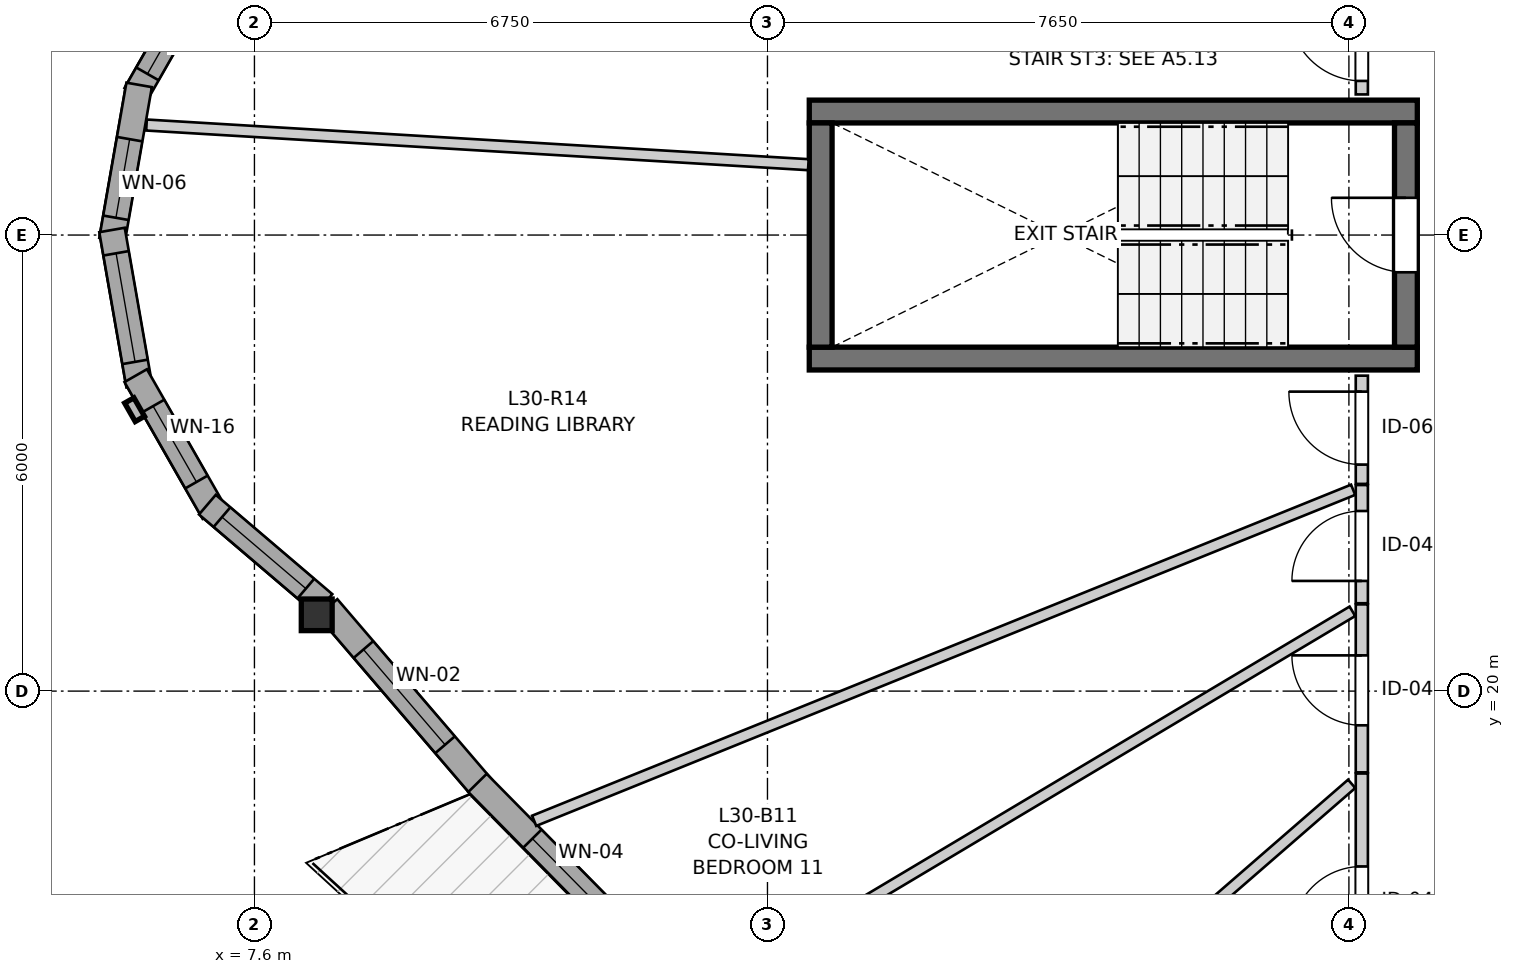
"""IFC4 building model, lengths in metres.
Left out: names, types, materials, properties, quantities, classifications, styles, units other than length and angle.
Written with IfcOpenShell. Run it as: python <this file> out.ifc"""

import sys

from ifc_helpers import new_model, si_unit, direction, frame, frame_2d, origin, origin_2d, place, context, subcontext, project, spatial, rectangle, i_section, extrude, source, transform, mapped, element, fill, save


model = new_model("IFC4")
c1 = context("Model", 3, precision=1e-05, world=origin(), true_north=direction((0.0, 1.0)))
c2 = subcontext(c1, "Body", "Model", "MODEL_VIEW")
j1 = project(units=[si_unit("LENGTHUNIT", "METRE"), si_unit("PLANEANGLEUNIT", "RADIAN")], contexts=[c1])
p1 = place(None, origin())
s1 = spatial("IfcSite", under=j1, at=p1, CompositionType="ELEMENT")
p2 = place(p1, origin())
s2 = spatial("IfcBuilding", under=s1, at=p2, CompositionType="ELEMENT")
p3 = place(p2, frame((0.0, 0.0, 102.4)))
s3 = spatial("IfcBuildingStorey", under=s2, at=p3, CompositionType="ELEMENT", Elevation=102.4)
for number, where, z_axis, x_axis in (
    (1, (14.9, 24.375, 0.0), (0.0, 0.0, 1.0), (1.0, 0.0, 0.0)),
    (2, (22.9, 27.625, 0.0), (0.0, 0.0, 1.0), (-1.0, 0.0, 0.0)),
):
    element("IfcWall", number, at=place(p3, frame(where, z_axis=z_axis, x_axis=x_axis)), inside=s3, PredefinedType="SHEAR", context=c2, shape_type="SweptSolid", body=[
        extrude(rectangle(XDim=8.0, YDim=0.3, at=frame_2d((4.0, 0.0))), origin(), (0.0, 0.0, 1.0), 2.95),
    ])
p4 = place(p3, frame((15.05, 27.475, 0.0), z_axis=(0.0, 0.0, 1.0), x_axis=(0.0, -1.0, 0.0)))
e3 = element("IfcWall", 3, at=p4, inside=s3, PredefinedType="SHEAR", context=c2, shape_type="SweptSolid", body=[
    extrude(rectangle(XDim=2.95, YDim=0.3, at=frame_2d((1.475, 0.0))), origin(), (0.0, 0.0, 1.0), 2.95),
])
p5 = place(p3, frame((22.75, 24.525, 0.0), z_axis=(0.0, 0.0, 1.0), x_axis=(0.0, 1.0, 0.0)))
e4 = element("IfcWall", 4, at=p5, inside=s3, PredefinedType="SHEAR", context=c2, shape_type="SweptSolid", body=[
    extrude(rectangle(XDim=2.95, YDim=0.3, at=frame_2d((1.475, 0.0))), origin(), (0.0, 0.0, 1.0), 2.95),
])
p6 = place(p5, frame((0.985, 0.0, 0.0)))
e5 = element("IfcOpeningElement", 5, at=p6, cuts=e4, PredefinedType="OPENING", context=c2, shape_type="SweptSolid", body=[
    extrude(rectangle(XDim=0.98, YDim=2.15, at=frame_2d((0.49, 1.075))), frame((0.0, 0.16, 0.0), z_axis=(0.0, -1.0, 0.0), x_axis=(1.0, 0.0, 0.0)), (0.0, 0.0, 1.0), 0.32),
])
m1 = source(origin(), c2, "Body", "SweptSolid", [
    extrude(i_section(OverallWidth=0.406, OverallDepth=0.416, WebThickness=0.027, FlangeThickness=0.044, FilletRadius=0.015, at=origin_2d()), origin(), (0.0, 0.0, 1.0), 2.95),
])
p7 = place(p3, frame((8.419, 21.004, 0.0), z_axis=(0.0, 0.0, 1.0), x_axis=(1.0, 0.0, 0.0)))
e6 = element("IfcColumn", 6, at=p7, inside=s3, PredefinedType="PILASTER", context=c2, shape_type="MappedRepresentation", body=[
    mapped(m1, transform((0.0, 0.0, 0.0), x_axis=(1.0, 0.0, 0.0), y_axis=(0.0, 1.0, 0.0), z_axis=(0.0, 0.0, 1.0), scale=1.0)),
])
p8 = place(p3, frame((7.066, 29.65, 0.0), z_axis=(0.0, 0.0, 1.0), x_axis=(-0.496037473582, -0.868301114132, 0.0)))
e7 = element("IfcWall", 7, at=p8, inside=s3, PredefinedType="SOLIDWALL", context=c2, shape_type="SweptSolid", body=[
    extrude(rectangle(XDim=2.073, YDim=0.34, at=frame_2d((1.037, 0.0))), origin(), (0.0, 0.0, 1.0), 2.48),
])
p9 = place(p8, frame((0.312, 0.0, 0.82)))
e8 = element("IfcOpeningElement", 8, at=p9, cuts=e7, PredefinedType="OPENING", context=c2, shape_type="SweptSolid", body=[
    extrude(rectangle(XDim=1.45, YDim=1.25, at=frame_2d((0.725, 0.625))), frame((0.0, 0.18, 0.0), z_axis=(0.0, -1.0, 0.0), x_axis=(1.0, 0.0, 0.0)), (0.0, 0.0, 1.0), 0.36),
])
p10 = place(p3, frame((6.083, 27.975, 0.0), z_axis=(0.0, 0.0, 1.0), x_axis=(-0.172186061474, -0.985064444711, 0.0)))
e9 = element("IfcWall", 9, at=p10, inside=s3, PredefinedType="SOLIDWALL", context=c2, shape_type="SweptSolid", body=[
    extrude(rectangle(XDim=2.073, YDim=0.34, at=frame_2d((1.037, 0.0))), origin(), (0.0, 0.0, 1.0), 2.48),
])
p11 = place(p10, frame((0.725, 0.0, 0.82)))
e10 = element("IfcOpeningElement", 10, at=p11, cuts=e9, PredefinedType="OPENING", context=c2, shape_type="SweptSolid", body=[
    extrude(rectangle(XDim=1.05, YDim=1.45, at=frame_2d((0.525, 0.725))), frame((0.0, 0.18, 0.0), z_axis=(0.0, -1.0, 0.0), x_axis=(1.0, 0.0, 0.0)), (0.0, 0.0, 1.0), 0.36),
])
p12 = place(p3, frame((5.726, 26.067, 0.0), z_axis=(0.0, 0.0, 1.0), x_axis=(0.172186061474, -0.985064444711, 0.0)))
e11 = element("IfcWall", 11, at=p12, inside=s3, PredefinedType="SOLIDWALL", context=c2, shape_type="SweptSolid", body=[
    extrude(rectangle(XDim=2.073, YDim=0.34, at=frame_2d((1.037, 0.0))), origin(), (0.0, 0.0, 1.0), 2.48),
])
p13 = place(p12, frame((0.312, 0.0, 0.82)))
e12 = element("IfcOpeningElement", 12, at=p13, cuts=e11, PredefinedType="OPENING", context=c2, shape_type="SweptSolid", body=[
    extrude(rectangle(XDim=1.45, YDim=1.25, at=frame_2d((0.725, 0.625))), frame((0.0, 0.18, 0.0), z_axis=(0.0, -1.0, 0.0), x_axis=(1.0, 0.0, 0.0)), (0.0, 0.0, 1.0), 0.36),
])
p14 = place(p3, frame((6.038, 24.15, 0.0), z_axis=(0.0, 0.0, 1.0), x_axis=(0.496037473582, -0.868301114132, 0.0)))
e13 = element("IfcWall", 13, at=p14, inside=s3, PredefinedType="SOLIDWALL", context=c2, shape_type="SweptSolid", body=[
    extrude(rectangle(XDim=2.073, YDim=0.34, at=frame_2d((1.037, 0.0))), origin(), (0.0, 0.0, 1.0), 2.48),
])
p15 = place(p14, frame((0.461, 0.0, 0.82)))
e14 = element("IfcOpeningElement", 14, at=p15, cuts=e13, PredefinedType="OPENING", context=c2, shape_type="SweptSolid", body=[
    extrude(rectangle(XDim=1.15, YDim=1.2, at=frame_2d((0.575, 0.6))), frame((0.0, 0.18, 0.0), z_axis=(0.0, -1.0, 0.0), x_axis=(1.0, 0.0, 0.0)), (0.0, 0.0, 1.0), 0.36),
])
p16 = place(p3, frame((6.981, 22.453, 0.0), z_axis=(0.0, 0.0, 1.0), x_axis=(0.761092561451, -0.648643286332, 0.0)))
e15 = element("IfcWall", 15, at=p16, inside=s3, PredefinedType="SOLIDWALL", context=c2, shape_type="SweptSolid", body=[
    extrude(rectangle(XDim=2.015, YDim=0.34, at=frame_2d((1.007, 0.0))), origin(), (0.0, 0.0, 1.0), 2.48),
])
p17 = place(p16, frame((0.252, 0.0, 0.82)))
e16 = element("IfcOpeningElement", 16, at=p17, cuts=e15, PredefinedType="OPENING", context=c2, shape_type="SweptSolid", body=[
    extrude(rectangle(XDim=1.45, YDim=1.25, at=frame_2d((0.725, 0.625))), frame((0.0, 0.18, 0.0), z_axis=(0.0, -1.0, 0.0), x_axis=(1.0, 0.0, 0.0)), (0.0, 0.0, 1.0), 0.36),
])
p18 = place(p3, frame((8.562, 21.099, 0.0), z_axis=(0.0, 0.0, 1.0), x_axis=(0.650778499588, -0.75926763692, 0.0)))
e17 = element("IfcWall", 17, at=p18, inside=s3, PredefinedType="SOLIDWALL", context=c2, shape_type="SweptSolid", body=[
    extrude(rectangle(XDim=3.124, YDim=0.34, at=frame_2d((1.562, 0.0))), origin(), (0.0, 0.0, 1.0), 2.48),
])
p19 = place(p18, frame((0.727, 0.0, 0.82)))
e18 = element("IfcOpeningElement", 18, at=p19, cuts=e17, PredefinedType="OPENING", context=c2, shape_type="SweptSolid", body=[
    extrude(rectangle(XDim=1.65, YDim=1.45, at=frame_2d((0.825, 0.725))), frame((0.0, 0.18, 0.0), z_axis=(0.0, -1.0, 0.0), x_axis=(1.0, 0.0, 0.0)), (0.0, 0.0, 1.0), 0.36),
])
p20 = place(p3, frame((10.535, 18.792, 0.0), z_axis=(0.0, 0.0, 1.0), x_axis=(0.701902141766, -0.7122733909, 0.0)))
e19 = element("IfcWall", 19, at=p20, inside=s3, PredefinedType="SOLIDWALL", context=c2, shape_type="SweptSolid", body=[
    extrude(rectangle(XDim=2.848, YDim=0.34, at=frame_2d((1.424, 0.0))), origin(), (0.0, 0.0, 1.0), 2.48),
])
p21 = place(p20, frame((1.029, 0.0, 0.82)))
e20 = element("IfcOpeningElement", 20, at=p21, cuts=e19, PredefinedType="OPENING", context=c2, shape_type="SweptSolid", body=[
    extrude(rectangle(XDim=1.35, YDim=1.45, at=frame_2d((0.675, 0.725))), frame((0.0, 0.18, 0.0), z_axis=(0.0, -1.0, 0.0), x_axis=(1.0, 0.0, 0.0)), (0.0, 0.0, 1.0), 0.36),
])
p22 = place(p3, frame((22.17, 15.57, 0.0), z_axis=(0.0, 0.0, 1.0), x_axis=(0.0, 1.0, 0.0)))
e21 = element("IfcWall", 21, at=p22, inside=s3, PredefinedType="PARTITIONING", context=c2, shape_type="SweptSolid", body=[
    extrude(rectangle(XDim=3.346, YDim=0.16, at=frame_2d((1.673, 0.0))), origin(), (0.0, 0.0, 1.0), 2.95),
])
p23 = place(p22, frame((1.203, 0.0, 0.0)))
e22 = element("IfcOpeningElement", 22, at=p23, cuts=e21, PredefinedType="OPENING", context=c2, shape_type="SweptSolid", body=[
    extrude(rectangle(XDim=0.92, YDim=2.1, at=frame_2d((0.46, 1.05))), frame((0.0, 0.09, 0.0), z_axis=(0.0, -1.0, 0.0), x_axis=(1.0, 0.0, 0.0)), (0.0, 0.0, 1.0), 0.18),
])
p24 = place(p3, frame((22.17, 18.931, 0.0), z_axis=(0.0, 0.0, 1.0), x_axis=(0.0, 1.0, 0.0)))
e23 = element("IfcWall", 23, at=p24, inside=s3, PredefinedType="PARTITIONING", context=c2, shape_type="SweptSolid", body=[
    extrude(rectangle(XDim=2.21, YDim=0.16, at=frame_2d((1.105, 0.0))), origin(), (0.0, 0.0, 1.0), 2.95),
])
p25 = place(p24, frame((0.619, 0.0, 0.0)))
e24 = element("IfcOpeningElement", 24, at=p25, cuts=e23, PredefinedType="OPENING", context=c2, shape_type="SweptSolid", body=[
    extrude(rectangle(XDim=0.92, YDim=2.1, at=frame_2d((0.46, 1.05))), frame((0.0, 0.09, 0.0), z_axis=(0.0, -1.0, 0.0), x_axis=(1.0, 0.0, 0.0)), (0.0, 0.0, 1.0), 0.18),
])
p26 = place(p3, frame((22.17, 21.156, 0.0), z_axis=(0.0, 0.0, 1.0), x_axis=(0.0, 1.0, 0.0)))
e25 = element("IfcWall", 25, at=p26, inside=s3, PredefinedType="PARTITIONING", context=c2, shape_type="SweptSolid", body=[
    extrude(rectangle(XDim=1.555, YDim=0.16, at=frame_2d((0.777, 0.0))), origin(), (0.0, 0.0, 1.0), 2.95),
])
p27 = place(p26, frame((0.293, 0.0, 0.0)))
e26 = element("IfcOpeningElement", 26, at=p27, cuts=e25, PredefinedType="OPENING", context=c2, shape_type="SweptSolid", body=[
    extrude(rectangle(XDim=0.92, YDim=2.1, at=frame_2d((0.46, 1.05))), frame((0.0, 0.09, 0.0), z_axis=(0.0, -1.0, 0.0), x_axis=(1.0, 0.0, 0.0)), (0.0, 0.0, 1.0), 0.18),
])
p28 = place(p3, frame((22.17, 22.726, 0.0), z_axis=(0.0, 0.0, 1.0), x_axis=(0.0, 1.0, 0.0)))
e27 = element("IfcWall", 27, at=p28, inside=s3, PredefinedType="PARTITIONING", context=c2, shape_type="SweptSolid", body=[
    extrude(rectangle(XDim=1.424, YDim=0.16, at=frame_2d((0.712, 0.0))), origin(), (0.0, 0.0, 1.0), 2.95),
])
p29 = place(p28, frame((0.254, 0.0, 0.0)))
e28 = element("IfcOpeningElement", 28, at=p29, cuts=e27, PredefinedType="OPENING", context=c2, shape_type="SweptSolid", body=[
    extrude(rectangle(XDim=0.96, YDim=2.1, at=frame_2d((0.48, 1.05))), frame((0.0, 0.09, 0.0), z_axis=(0.0, -1.0, 0.0), x_axis=(1.0, 0.0, 0.0)), (0.0, 0.0, 1.0), 0.18),
])
p30 = place(p3, frame((22.17, 27.85, 0.0), z_axis=(0.0, 0.0, 1.0), x_axis=(0.0, 1.0, 0.0)))
e29 = element("IfcWall", 29, at=p30, inside=s3, PredefinedType="PARTITIONING", context=c2, shape_type="SweptSolid", body=[
    extrude(rectangle(XDim=1.283, YDim=0.16, at=frame_2d((0.642, 0.0))), origin(), (0.0, 0.0, 1.0), 2.95),
])
p31 = place(p30, frame((0.177, 0.0, 0.0)))
e30 = element("IfcOpeningElement", 30, at=p31, cuts=e29, PredefinedType="OPENING", context=c2, shape_type="SweptSolid", body=[
    extrude(rectangle(XDim=0.96, YDim=2.1, at=frame_2d((0.48, 1.05))), frame((0.0, 0.09, 0.0), z_axis=(0.0, -1.0, 0.0), x_axis=(1.0, 0.0, 0.0)), (0.0, 0.0, 1.0), 0.18),
])
p32 = place(p3, frame((11.28, 18.294, 0.0), z_axis=(0.0, 0.0, 1.0), x_axis=(0.927137862507, 0.374720407645, 0.0)))
e31 = element("IfcWall", 31, at=p32, inside=s3, PredefinedType="PARTITIONING", context=c2, shape_type="SweptSolid", body=[
    extrude(rectangle(XDim=11.622, YDim=0.145, at=frame_2d((5.811, 0.0))), origin(), (0.0, 0.0, 1.0), 2.95),
])
p33 = place(p3, frame((13.622, 16.028, 0.0), z_axis=(0.0, 0.0, 1.0), x_axis=(0.85896108151, 0.512040877716, 0.0)))
e32 = element("IfcWall", 32, at=p33, inside=s3, PredefinedType="PARTITIONING", context=c2, shape_type="SweptSolid", body=[
    extrude(rectangle(XDim=9.807, YDim=0.145, at=frame_2d((4.904, 0.0))), origin(), (0.0, 0.0, 1.0), 2.95),
])
p34 = place(p3, frame((6.18, 27.448, 0.0), z_axis=(0.0, 0.0, 1.0), x_axis=(0.998209995059, -0.059806402362, 0.0)))
e33 = element("IfcWall", 33, at=p34, inside=s3, PredefinedType="PARTITIONING", context=c2, shape_type="SweptSolid", body=[
    extrude(rectangle(XDim=8.724, YDim=0.145, at=frame_2d((4.362, 0.0))), origin(), (0.0, 0.0, 1.0), 2.95),
])
p35 = place(p3, frame((19.736, 16.782, 0.0), z_axis=(0.0, 0.0, 1.0), x_axis=(0.754964216329, 0.655765988796, 0.0)))
e34 = element("IfcWall", 34, at=p35, inside=s3, PredefinedType="PARTITIONING", context=c2, shape_type="SweptSolid", body=[
    extrude(rectangle(XDim=3.047, YDim=0.145, at=frame_2d((1.523, 0.0))), origin(), (0.0, 0.0, 1.0), 2.95),
])
m2 = source(origin(), c2, "Body", "SweptSolid", [
    extrude(rectangle(XDim=1.45, YDim=1.25, at=frame_2d((0.725, 0.625))), frame((0.0, 0.03, 0.0), z_axis=(0.0, -1.0, 0.0), x_axis=(1.0, 0.0, 0.0)), (0.0, 0.0, 1.0), 0.06),
])
p36 = place(p9, origin())
e35 = element("IfcWindow", 35, at=p36, inside=s3, PartitioningType="SINGLE_PANEL", PredefinedType="WINDOW", context=c2, shape_type="MappedRepresentation", body=[
    mapped(m2, transform((0.0, 0.0, 0.0), x_axis=(1.0, 0.0, 0.0), y_axis=(0.0, 1.0, 0.0), z_axis=(0.0, 0.0, 1.0), scale=1.0)),
])
fill(e8, e35)
m3 = source(origin(), c2, "Body", "SweptSolid", [
    extrude(rectangle(XDim=1.05, YDim=1.45, at=frame_2d((0.525, 0.725))), frame((0.0, 0.03, 0.0), z_axis=(0.0, -1.0, 0.0), x_axis=(1.0, 0.0, 0.0)), (0.0, 0.0, 1.0), 0.06),
])
p37 = place(p11, origin())
e36 = element("IfcWindow", 36, at=p37, inside=s3, PartitioningType="SINGLE_PANEL", PredefinedType="WINDOW", context=c2, shape_type="MappedRepresentation", body=[
    mapped(m3, transform((0.0, 0.0, 0.0), x_axis=(1.0, 0.0, 0.0), y_axis=(0.0, 1.0, 0.0), z_axis=(0.0, 0.0, 1.0), scale=1.0)),
])
fill(e10, e36)
p38 = place(p13, origin())
e37 = element("IfcWindow", 37, at=p38, inside=s3, PartitioningType="SINGLE_PANEL", PredefinedType="WINDOW", context=c2, shape_type="MappedRepresentation", body=[
    mapped(m2, transform((0.0, 0.0, 0.0), x_axis=(1.0, 0.0, 0.0), y_axis=(0.0, 1.0, 0.0), z_axis=(0.0, 0.0, 1.0), scale=1.0)),
])
fill(e12, e37)
m4 = source(origin(), c2, "Body", "SweptSolid", [
    extrude(rectangle(XDim=1.15, YDim=1.2, at=frame_2d((0.575, 0.6))), frame((0.0, 0.03, 0.0), z_axis=(0.0, -1.0, 0.0), x_axis=(1.0, 0.0, 0.0)), (0.0, 0.0, 1.0), 0.06),
])
p39 = place(p15, origin())
e38 = element("IfcWindow", 38, at=p39, inside=s3, PartitioningType="SINGLE_PANEL", PredefinedType="WINDOW", context=c2, shape_type="MappedRepresentation", body=[
    mapped(m4, transform((0.0, 0.0, 0.0), x_axis=(1.0, 0.0, 0.0), y_axis=(0.0, 1.0, 0.0), z_axis=(0.0, 0.0, 1.0), scale=1.0)),
])
fill(e14, e38)
p40 = place(p17, origin())
e39 = element("IfcWindow", 39, at=p40, inside=s3, PartitioningType="SINGLE_PANEL", PredefinedType="WINDOW", context=c2, shape_type="MappedRepresentation", body=[
    mapped(m2, transform((0.0, 0.0, 0.0), x_axis=(1.0, 0.0, 0.0), y_axis=(0.0, 1.0, 0.0), z_axis=(0.0, 0.0, 1.0), scale=1.0)),
])
fill(e16, e39)
m5 = source(origin(), c2, "Body", "SweptSolid", [
    extrude(rectangle(XDim=1.65, YDim=1.45, at=frame_2d((0.825, 0.725))), frame((0.0, 0.03, 0.0), z_axis=(0.0, -1.0, 0.0), x_axis=(1.0, 0.0, 0.0)), (0.0, 0.0, 1.0), 0.06),
])
p41 = place(p19, origin())
e40 = element("IfcWindow", 40, at=p41, inside=s3, PartitioningType="SINGLE_PANEL", PredefinedType="WINDOW", context=c2, shape_type="MappedRepresentation", body=[
    mapped(m5, transform((0.0, 0.0, 0.0), x_axis=(1.0, 0.0, 0.0), y_axis=(0.0, 1.0, 0.0), z_axis=(0.0, 0.0, 1.0), scale=1.0)),
])
fill(e18, e40)
m6 = source(origin(), c2, "Body", "SweptSolid", [
    extrude(rectangle(XDim=1.35, YDim=1.45, at=frame_2d((0.675, 0.725))), frame((0.0, 0.03, 0.0), z_axis=(0.0, -1.0, 0.0), x_axis=(1.0, 0.0, 0.0)), (0.0, 0.0, 1.0), 0.06),
])
p42 = place(p21, origin())
e41 = element("IfcWindow", 41, at=p42, inside=s3, PartitioningType="SINGLE_PANEL", PredefinedType="WINDOW", context=c2, shape_type="MappedRepresentation", body=[
    mapped(m6, transform((0.0, 0.0, 0.0), x_axis=(1.0, 0.0, 0.0), y_axis=(0.0, 1.0, 0.0), z_axis=(0.0, 0.0, 1.0), scale=1.0)),
])
fill(e20, e41)
m7 = source(origin(), c2, "Body", "SweptSolid", [
    extrude(rectangle(XDim=0.98, YDim=2.15, at=frame_2d((0.49, 1.075))), frame((0.0, 0.025, 0.0), z_axis=(0.0, -1.0, 0.0), x_axis=(1.0, 0.0, 0.0)), (0.0, 0.0, 1.0), 0.05),
])
p43 = place(p6, origin())
e42 = element("IfcDoor", 42, at=p43, inside=s3, OperationType="SINGLE_SWING_RIGHT", PredefinedType="DOOR", context=c2, shape_type="MappedRepresentation", body=[
    mapped(m7, transform((0.0, 0.0, 0.0), x_axis=(1.0, 0.0, 0.0), y_axis=(0.0, 1.0, 0.0), z_axis=(0.0, 0.0, 1.0), scale=1.0)),
])
fill(e5, e42)
m8 = source(origin(), c2, "Body", "SweptSolid", [
    extrude(rectangle(XDim=0.92, YDim=2.1, at=frame_2d((0.46, 1.05))), frame((0.0, 0.025, 0.0), z_axis=(0.0, -1.0, 0.0), x_axis=(1.0, 0.0, 0.0)), (0.0, 0.0, 1.0), 0.05),
])
p44 = place(p23, origin())
e43 = element("IfcDoor", 43, at=p44, inside=s3, OperationType="SINGLE_SWING_LEFT", PredefinedType="DOOR", context=c2, shape_type="MappedRepresentation", body=[
    mapped(m8, transform((0.0, 0.0, 0.0), x_axis=(1.0, 0.0, 0.0), y_axis=(0.0, 1.0, 0.0), z_axis=(0.0, 0.0, 1.0), scale=1.0)),
])
fill(e22, e43)
p45 = place(p25, origin())
e44 = element("IfcDoor", 44, at=p45, inside=s3, OperationType="SINGLE_SWING_RIGHT", PredefinedType="DOOR", context=c2, shape_type="MappedRepresentation", body=[
    mapped(m8, transform((0.0, 0.0, 0.0), x_axis=(1.0, 0.0, 0.0), y_axis=(0.0, 1.0, 0.0), z_axis=(0.0, 0.0, 1.0), scale=1.0)),
])
fill(e24, e44)
p46 = place(p27, origin())
e45 = element("IfcDoor", 45, at=p46, inside=s3, OperationType="SINGLE_SWING_LEFT", PredefinedType="DOOR", context=c2, shape_type="MappedRepresentation", body=[
    mapped(m8, transform((0.0, 0.0, 0.0), x_axis=(1.0, 0.0, 0.0), y_axis=(0.0, 1.0, 0.0), z_axis=(0.0, 0.0, 1.0), scale=1.0)),
])
fill(e26, e45)
m9 = source(origin(), c2, "Body", "SweptSolid", [
    extrude(rectangle(XDim=0.96, YDim=2.1, at=frame_2d((0.48, 1.05))), frame((0.0, 0.025, 0.0), z_axis=(0.0, -1.0, 0.0), x_axis=(1.0, 0.0, 0.0)), (0.0, 0.0, 1.0), 0.05),
])
p47 = place(p29, origin())
e46 = element("IfcDoor", 46, at=p47, inside=s3, OperationType="SINGLE_SWING_RIGHT", PredefinedType="DOOR", context=c2, shape_type="MappedRepresentation", body=[
    mapped(m9, transform((0.0, 0.0, 0.0), x_axis=(1.0, 0.0, 0.0), y_axis=(0.0, 1.0, 0.0), z_axis=(0.0, 0.0, 1.0), scale=1.0)),
])
fill(e28, e46)
p48 = place(p31, origin())
e47 = element("IfcDoor", 47, at=p48, inside=s3, OperationType="SINGLE_SWING_RIGHT", PredefinedType="DOOR", context=c2, shape_type="MappedRepresentation", body=[
    mapped(m9, transform((0.0, 0.0, 0.0), x_axis=(1.0, 0.0, 0.0), y_axis=(0.0, 1.0, 0.0), z_axis=(0.0, 0.0, 1.0), scale=1.0)),
])
fill(e30, e47)
save(model, sys.argv[1])
